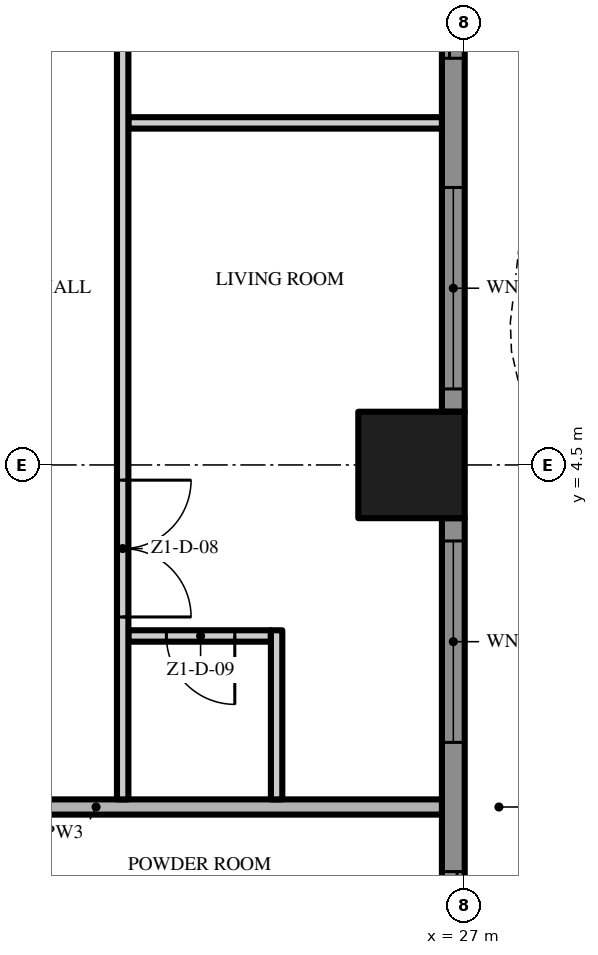
"""IFC4 building model, lengths in metres.
Left out: names, types, materials, properties, quantities, classifications, styles, units other than length and angle.
Written with IfcOpenShell. Run it as: python <this file> out.ifc"""

import sys

from ifc_helpers import new_model, si_unit, direction, frame, frame_2d, origin, origin_2d, place, context, subcontext, project, spatial, polyline, rectangle, outline, extrude, element, fill, save


model = new_model("IFC4")
c1 = context("Model", 3, precision=1e-05, world=origin(), true_north=direction((0.0, 1.0)))
c2 = subcontext(c1, "Body", "Model", "MODEL_VIEW")
j1 = project(units=[si_unit("LENGTHUNIT", "METRE"), si_unit("PLANEANGLEUNIT", "RADIAN")], contexts=[c1])
p1 = place(None, origin())
s1 = spatial("IfcSite", under=j1, at=p1, CompositionType="ELEMENT")
p2 = place(p1, origin())
s2 = spatial("IfcBuilding", under=s1, at=p2, CompositionType="ELEMENT")
p3 = place(p2, frame((0.0, 0.0, 49.2)))
s3 = spatial("IfcBuildingStorey", under=s2, at=p3, CompositionType="ELEMENT", Elevation=49.2)
p4 = place(p3, frame((26.3, 4.5, 0.0), z_axis=(0.0, 0.0, 1.0), x_axis=(1.0, 0.0, 0.0)))
e1 = element("IfcColumn", 1, at=p4, inside=s3, PredefinedType="COLUMN", context=c2, shape_type="SweptSolid", body=[
    extrude(rectangle(XDim=1.4, YDim=1.4, at=origin_2d()), origin(), (0.0, 0.0, 1.0), 3.5),
])
p5 = place(p3, frame((26.85, 3.8, 0.0), z_axis=(0.0, 0.0, 1.0), x_axis=(0.0, -1.0, 0.0)))
e2 = element("IfcWall", 2, at=p5, inside=s3, PredefinedType="SOLIDWALL", context=c2, shape_type="SweptSolid", body=[
    extrude(rectangle(XDim=7.6, YDim=0.3, at=frame_2d((3.8, 0.0))), origin(), (0.0, 0.0, 1.0), 3.5),
])
p6 = place(p5, frame((4.65, 0.0, 0.0)))
e3 = element("IfcOpeningElement", 3, at=p6, cuts=e2, PredefinedType="OPENING", context=c2, shape_type="SweptSolid", body=[
    extrude(rectangle(XDim=2.65, YDim=2.4, at=frame_2d((1.325, 1.2))), frame((0.0, 0.16, 0.0), z_axis=(0.0, -1.0, 0.0), x_axis=(1.0, 0.0, 0.0)), (0.0, 0.0, 1.0), 0.32),
])
p7 = place(p5, frame((0.3, 0.0, 0.45)))
e4 = element("IfcOpeningElement", 4, at=p7, cuts=e2, PredefinedType="OPENING", context=c2, shape_type="SweptSolid", body=[
    extrude(rectangle(XDim=2.65, YDim=2.65, at=frame_2d((1.325, 1.325))), frame((0.0, 0.16, 0.0), z_axis=(0.0, -1.0, 0.0), x_axis=(1.0, 0.0, 0.0)), (0.0, 0.0, 1.0), 0.32),
])
p8 = place(p3, frame((26.85, 12.8, 0.0), z_axis=(0.0, 0.0, 1.0), x_axis=(0.0, -1.0, 0.0)))
e5 = element("IfcWall", 5, at=p8, inside=s3, PredefinedType="SOLIDWALL", context=c2, shape_type="SweptSolid", body=[
    extrude(rectangle(XDim=7.6, YDim=0.3, at=frame_2d((3.8, 0.0))), origin(), (0.0, 0.0, 1.0), 3.5),
])
p9 = place(p8, frame((4.65, 0.0, 0.45)))
e6 = element("IfcOpeningElement", 6, at=p9, cuts=e5, PredefinedType="OPENING", context=c2, shape_type="SweptSolid", body=[
    extrude(rectangle(XDim=2.65, YDim=2.65, at=frame_2d((1.325, 1.325))), frame((0.0, 0.16, 0.0), z_axis=(0.0, -1.0, 0.0), x_axis=(1.0, 0.0, 0.0)), (0.0, 0.0, 1.0), 0.32),
])
p10 = place(p8, frame((0.3, 0.0, 0.0)))
e7 = element("IfcOpeningElement", 7, at=p10, cuts=e5, PredefinedType="OPENING", context=c2, shape_type="SweptSolid", body=[
    extrude(rectangle(XDim=2.65, YDim=2.4, at=frame_2d((1.325, 1.2))), frame((0.0, 0.16, 0.0), z_axis=(0.0, -1.0, 0.0), x_axis=(1.0, 0.0, 0.0)), (0.0, 0.0, 1.0), 0.32),
])
p11 = place(p3, origin())
e8 = element("IfcWall", 8, at=p11, inside=s3, PredefinedType="USERDEFINED", context=c2, shape_type="SweptSolid", body=[
    extrude(outline(polyline([(29.649, -18.0), (29.985, -16.5), (30.0, -16.125), (29.869, -15.0), (29.345, -13.5), (28.612, -12.0), (27.951, -10.5), (27.615, -9.0), (27.6, -8.625), (27.731, -7.5), (28.255, -6.0), (28.988, -4.5), (29.649, -3.0), (29.985, -1.5), (30.0, -1.125), (29.869, 0.0), (29.345, 1.5), (28.612, 3.0), (27.951, 4.5), (27.615, 6.0), (27.6, 6.375), (27.731, 7.5), (28.255, 9.0), (28.988, 10.5), (29.649, 12.0), (29.985, 13.5), (30.0, 13.875), (29.869, 15.0), (29.345, 16.5), (28.612, 18.0), (28.388, 17.89), (29.114, 16.404), (29.624, 14.944), (29.749, 13.865), (29.736, 13.533), (29.41, 12.079), (28.761, 10.605), (28.024, 9.096), (27.486, 7.556), (27.349, 6.385), (27.366, 5.967), (27.713, 4.421), (28.385, 2.895), (29.114, 1.404), (29.624, -0.056), (29.749, -1.135), (29.736, -1.467), (29.41, -2.921), (28.761, -4.395), (28.024, -5.904), (27.486, -7.444), (27.349, -8.615), (27.366, -9.033), (27.713, -10.579), (28.385, -12.105), (29.114, -13.596), (29.624, -15.056), (29.749, -16.135), (29.736, -16.467), (29.405, -17.945), (29.649, -18.0)])), origin(), (0.0, 0.0, 1.0), 0.9),
])
p12 = place(p3, frame((17.6, 0.0, 0.0), z_axis=(0.0, 0.0, 1.0), x_axis=(1.0, 0.0, 0.0)))
e9 = element("IfcWall", 9, at=p12, inside=s3, PredefinedType="PARTITIONING", context=c2, shape_type="SweptSolid", body=[
    extrude(rectangle(XDim=9.1, YDim=0.2, at=frame_2d((4.55, 0.0))), origin(), (0.0, 0.0, 1.0), 3.5),
])
p13 = place(p3, frame((24.45, 2.25, 0.0), z_axis=(0.0, 0.0, 1.0), x_axis=(-1.0, 0.0, 0.0)))
e10 = element("IfcWall", 10, at=p13, inside=s3, PredefinedType="PARTITIONING", context=c2, shape_type="SweptSolid", body=[
    extrude(rectangle(XDim=1.875, YDim=0.15, at=frame_2d((0.938, 0.0))), origin(), (0.0, 0.0, 1.0), 3.5),
])
p14 = place(p13, frame((0.475, 0.0, 0.0)))
e11 = element("IfcOpeningElement", 11, at=p14, cuts=e10, PredefinedType="OPENING", context=c2, shape_type="SweptSolid", body=[
    extrude(rectangle(XDim=0.9, YDim=2.1, at=frame_2d((0.45, 1.05))), frame((0.0, 0.085, 0.0), z_axis=(0.0, -1.0, 0.0), x_axis=(1.0, 0.0, 0.0)), (0.0, 0.0, 1.0), 0.17),
])
p15 = place(p3, frame((22.575, 9.0, 0.0), z_axis=(0.0, 0.0, 1.0), x_axis=(1.0, 0.0, 0.0)))
e12 = element("IfcWall", 12, at=p15, inside=s3, PredefinedType="PARTITIONING", context=c2, shape_type="SweptSolid", body=[
    extrude(rectangle(XDim=4.125, YDim=0.15, at=frame_2d((2.062, 0.0))), origin(), (0.0, 0.0, 1.0), 3.5),
])
p16 = place(p3, frame((22.5, 17.3, 0.0), z_axis=(0.0, 0.0, 1.0), x_axis=(0.0, -1.0, 0.0)))
e13 = element("IfcWall", 13, at=p16, inside=s3, PredefinedType="PARTITIONING", context=c2, shape_type="SweptSolid", body=[
    extrude(rectangle(XDim=17.2, YDim=0.15, at=frame_2d((8.6, 0.0))), origin(), (0.0, 0.0, 1.0), 3.5),
])
p17 = place(p16, frame((13.0, 0.0, 0.0)))
e14 = element("IfcOpeningElement", 14, at=p17, cuts=e13, PredefinedType="OPENING", context=c2, shape_type="SweptSolid", body=[
    extrude(rectangle(XDim=1.8, YDim=2.4, at=frame_2d((0.9, 1.2))), frame((0.0, 0.085, 0.0), z_axis=(0.0, -1.0, 0.0), x_axis=(1.0, 0.0, 0.0)), (0.0, 0.0, 1.0), 0.17),
])
p18 = place(p16, frame((5.55, 0.0, 0.0)))
e15 = element("IfcOpeningElement", 15, at=p18, cuts=e13, PredefinedType="OPENING", context=c2, shape_type="SweptSolid", body=[
    extrude(rectangle(XDim=1.0, YDim=2.4, at=frame_2d((0.5, 1.2))), frame((0.0, 0.085, 0.0), z_axis=(0.0, -1.0, 0.0), x_axis=(1.0, 0.0, 0.0)), (0.0, 0.0, 1.0), 0.17),
])
p19 = place(p16, frame((0.15, 0.0, 0.0)))
e16 = element("IfcOpeningElement", 16, at=p19, cuts=e13, PredefinedType="OPENING", context=c2, shape_type="SweptSolid", body=[
    extrude(rectangle(XDim=1.0, YDim=2.4, at=frame_2d((0.5, 1.2))), frame((0.0, 0.085, 0.0), z_axis=(0.0, -1.0, 0.0), x_axis=(1.0, 0.0, 0.0)), (0.0, 0.0, 1.0), 0.17),
])
p20 = place(p3, frame((24.525, 0.1, 0.0), z_axis=(0.0, 0.0, 1.0), x_axis=(0.0, 1.0, 0.0)))
e17 = element("IfcWall", 17, at=p20, inside=s3, PredefinedType="PARTITIONING", context=c2, shape_type="SweptSolid", body=[
    extrude(rectangle(XDim=2.225, YDim=0.15, at=frame_2d((1.113, 0.0))), origin(), (0.0, 0.0, 1.0), 3.5),
])
p21 = place(p6, origin())
e18 = element("IfcDoor", 18, at=p21, inside=s3, OperationType="SINGLE_SWING_LEFT", PredefinedType="DOOR", context=c2, shape_type="SweptSolid", body=[
    extrude(rectangle(XDim=2.65, YDim=2.4, at=frame_2d((1.325, 1.2))), frame((0.0, 0.025, 0.0), z_axis=(0.0, -1.0, 0.0), x_axis=(1.0, 0.0, 0.0)), (0.0, 0.0, 1.0), 0.05),
])
fill(e3, e18)
p22 = place(p7, origin())
e19 = element("IfcWindow", 19, at=p22, inside=s3, PartitioningType="SINGLE_PANEL", PredefinedType="WINDOW", context=c2, shape_type="SweptSolid", body=[
    extrude(rectangle(XDim=2.65, YDim=2.65, at=frame_2d((1.325, 1.325))), frame((0.0, 0.03, 0.0), z_axis=(0.0, -1.0, 0.0), x_axis=(1.0, 0.0, 0.0)), (0.0, 0.0, 1.0), 0.06),
])
fill(e4, e19)
p23 = place(p9, origin())
e20 = element("IfcWindow", 20, at=p23, inside=s3, PartitioningType="SINGLE_PANEL", PredefinedType="WINDOW", context=c2, shape_type="SweptSolid", body=[
    extrude(rectangle(XDim=2.65, YDim=2.65, at=frame_2d((1.325, 1.325))), frame((0.0, 0.03, 0.0), z_axis=(0.0, -1.0, 0.0), x_axis=(1.0, 0.0, 0.0)), (0.0, 0.0, 1.0), 0.06),
])
fill(e6, e20)
p24 = place(p10, origin())
e21 = element("IfcDoor", 21, at=p24, inside=s3, OperationType="SINGLE_SWING_LEFT", PredefinedType="DOOR", context=c2, shape_type="SweptSolid", body=[
    extrude(rectangle(XDim=2.65, YDim=2.4, at=frame_2d((1.325, 1.2))), frame((0.0, 0.025, 0.0), z_axis=(0.0, -1.0, 0.0), x_axis=(1.0, 0.0, 0.0)), (0.0, 0.0, 1.0), 0.05),
])
fill(e7, e21)
p25 = place(p17, origin())
e22 = element("IfcDoor", 22, at=p25, inside=s3, OperationType="DOUBLE_DOOR_SINGLE_SWING", PredefinedType="DOOR", context=c2, shape_type="SweptSolid", body=[
    extrude(rectangle(XDim=1.8, YDim=2.4, at=frame_2d((0.9, 1.2))), frame((0.0, 0.025, 0.0), z_axis=(0.0, -1.0, 0.0), x_axis=(1.0, 0.0, 0.0)), (0.0, 0.0, 1.0), 0.05),
])
fill(e14, e22)
p26 = place(p14, origin())
e23 = element("IfcDoor", 23, at=p26, inside=s3, OperationType="SINGLE_SWING_LEFT", PredefinedType="DOOR", context=c2, shape_type="SweptSolid", body=[
    extrude(rectangle(XDim=0.9, YDim=2.1, at=frame_2d((0.45, 1.05))), frame((0.0, 0.025, 0.0), z_axis=(0.0, -1.0, 0.0), x_axis=(1.0, 0.0, 0.0)), (0.0, 0.0, 1.0), 0.05),
])
fill(e11, e23)
save(model, sys.argv[1])
